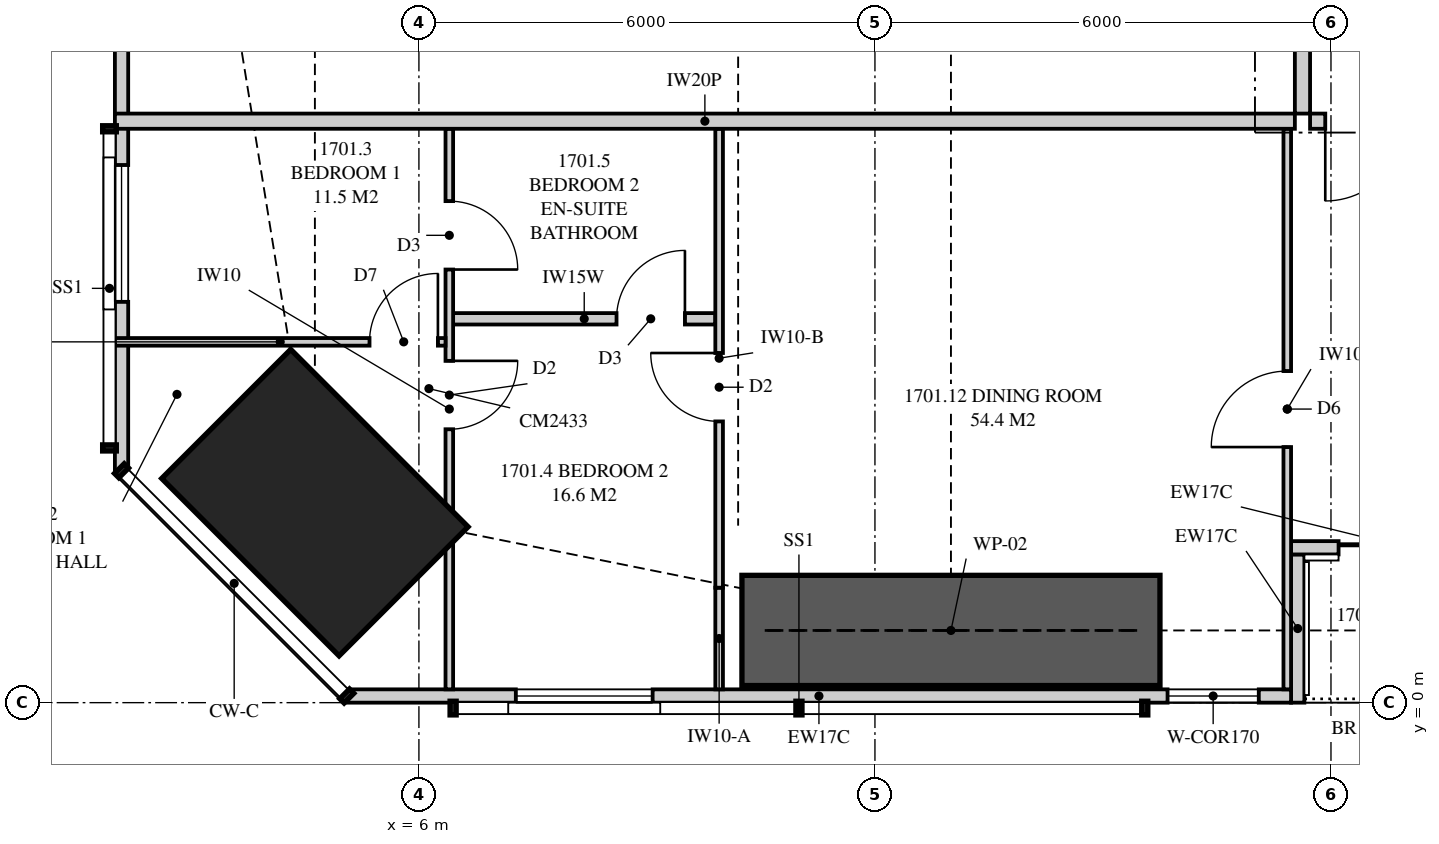
"""IFC4 building model, lengths in metres.
Left out: names, types, materials, properties, quantities, classifications, styles, units other than length and angle.
Written with IfcOpenShell. Run it as: python <this file> out.ifc"""

import sys

from ifc_helpers import new_model, si_unit, direction, frame, frame_2d, origin, origin_2d, place, context, subcontext, project, spatial, polyline, rectangle, outline, extrude, element, fill, save


model = new_model("IFC4")
c1 = context("Model", 3, precision=1e-05, world=origin(), true_north=direction((0.0, 1.0)))
c2 = subcontext(c1, "Body", "Model", "MODEL_VIEW")
j1 = project(units=[si_unit("LENGTHUNIT", "METRE"), si_unit("PLANEANGLEUNIT", "RADIAN")], contexts=[c1])
p1 = place(None, origin())
s1 = spatial("IfcSite", under=j1, at=p1, CompositionType="ELEMENT")
p2 = place(p1, origin())
s2 = spatial("IfcBuilding", under=s1, at=p2, CompositionType="ELEMENT")
p3 = place(p2, frame((0.0, 0.0, 64.55)))
s3 = spatial("IfcBuildingStorey", under=s2, at=p3, CompositionType="ELEMENT", Elevation=64.55)
p4 = place(p3, frame((4.631, 2.631, 0.0), z_axis=(0.0, 0.0, 1.0), x_axis=(0.707106781187, 0.707106781187, 0.0)))
e1 = element("IfcColumn", 1, at=p4, inside=s3, PredefinedType="COLUMN", context=c2, shape_type="SweptSolid", body=[
    extrude(rectangle(XDim=2.4, YDim=3.3, at=origin_2d()), origin(), (0.0, 0.0, 1.0), 3.35),
])
p5 = place(p3, frame((5.051, 0.087, 0.0), z_axis=(0.0, 0.0, 1.0), x_axis=(1.0, 0.0, 0.0)))
e2 = element("IfcWall", 2, at=p5, inside=s3, PredefinedType="SOLIDWALL", context=c2, shape_type="SweptSolid", body=[
    extrude(outline(polyline([(0.0, 0.0), (12.424, 0.0), (12.424, 2.15), (7.949, 2.15), (7.949, 3.11), (7.793, 3.11), (7.793, 2.15), (7.745, 2.15), (7.745, 3.11), (0.0, 3.11), (0.0, 0.0)])), frame((0.0, 0.087, 0.0), z_axis=(0.0, -1.0, 0.0), x_axis=(1.0, 0.0, 0.0)), (0.0, 0.0, 1.0), 0.175),
])
p6 = place(p5, frame((2.224, 0.0, 0.4)))
e3 = element("IfcOpeningElement", 3, at=p6, cuts=e2, PredefinedType="OPENING", context=c2, shape_type="SweptSolid", body=[
    extrude(rectangle(XDim=1.8, YDim=1.7, at=frame_2d((0.9, 0.85))), frame((0.0, 0.097, 0.0), z_axis=(0.0, -1.0, 0.0), x_axis=(1.0, 0.0, 0.0)), (0.0, 0.0, 1.0), 0.195),
])
p7 = place(p5, frame((10.799, 0.0, 0.4)))
e4 = element("IfcOpeningElement", 4, at=p7, cuts=e2, PredefinedType="OPENING", context=c2, shape_type="SweptSolid", body=[
    extrude(rectangle(XDim=1.2, YDim=1.7, at=frame_2d((0.6, 0.85))), frame((0.0, 0.097, 0.0), z_axis=(0.0, -1.0, 0.0), x_axis=(1.0, 0.0, 0.0)), (0.0, 0.0, 1.0), 0.195),
])
p8 = place(p3, frame((17.475, 2.038, 0.0), z_axis=(0.0, 0.0, 1.0), x_axis=(1.0, 0.0, 0.0)))
e5 = element("IfcWall", 5, at=p8, inside=s3, PredefinedType="SOLIDWALL", context=c2, shape_type="SweptSolid", body=[
    extrude(rectangle(XDim=3.05, YDim=0.175, at=frame_2d((1.525, 0.0))), origin(), (0.0, 0.0, 1.0), 3.11),
])
p9 = place(p8, frame((0.625, 0.0, 0.0)))
e6 = element("IfcOpeningElement", 6, at=p9, cuts=e5, PredefinedType="OPENING", context=c2, shape_type="SweptSolid", body=[
    extrude(rectangle(XDim=1.8, YDim=2.1, at=frame_2d((0.9, 1.05))), frame((0.0, 0.097, 0.0), z_axis=(0.0, -1.0, 0.0), x_axis=(1.0, 0.0, 0.0)), (0.0, 0.0, 1.0), 0.195),
])
p10 = place(p3, frame((17.562, 0.0, 0.0), z_axis=(0.0, 0.0, 1.0), x_axis=(0.0, 1.0, 0.0)))
e7 = element("IfcWall", 7, at=p10, inside=s3, PredefinedType="SOLIDWALL", context=c2, shape_type="SweptSolid", body=[
    extrude(outline(polyline([(0.0, 0.0), (1.95, 0.0), (1.95, 3.11), (1.75, 3.11), (1.75, 2.15), (0.15, 2.15), (0.15, 3.11), (0.0, 3.11), (0.0, 0.0)])), frame((0.0, 0.087, 0.0), z_axis=(0.0, -1.0, 0.0), x_axis=(1.0, 0.0, 0.0)), (0.0, 0.0, 1.0), 0.175),
])
p11 = place(p3, frame((2.087, 19.15, 0.0), z_axis=(0.0, 0.0, 1.0), x_axis=(0.0, -1.0, 0.0)))
e8 = element("IfcWall", 8, at=p11, inside=s3, PredefinedType="SOLIDWALL", context=c2, shape_type="SweptSolid", body=[
    extrude(outline(polyline([(0.0, 0.0), (16.099, 0.0), (16.099, 3.11), (6.369, 3.11), (6.369, 2.15), (6.276, 2.15), (6.276, 3.11), (6.15, 3.11), (6.15, 2.15), (0.0, 2.15), (0.0, 0.0)])), frame((0.0, 0.087, 0.0), z_axis=(0.0, -1.0, 0.0), x_axis=(1.0, 0.0, 0.0)), (0.0, 0.0, 1.0), 0.175),
])
p12 = place(p11, frame((1.488, 0.0, 0.4)))
e9 = element("IfcOpeningElement", 9, at=p12, cuts=e8, PredefinedType="OPENING", context=c2, shape_type="SweptSolid", body=[
    extrude(rectangle(XDim=1.8, YDim=1.7, at=frame_2d((0.9, 0.85))), frame((0.0, 0.097, 0.0), z_axis=(0.0, -1.0, 0.0), x_axis=(1.0, 0.0, 0.0)), (0.0, 0.0, 1.0), 0.195),
])
p13 = place(p11, frame((9.106, 0.0, 0.4)))
e10 = element("IfcOpeningElement", 10, at=p13, cuts=e8, PredefinedType="OPENING", context=c2, shape_type="SweptSolid", body=[
    extrude(rectangle(XDim=1.2, YDim=1.7, at=frame_2d((0.6, 0.85))), frame((0.0, 0.097, 0.0), z_axis=(0.0, -1.0, 0.0), x_axis=(1.0, 0.0, 0.0)), (0.0, 0.0, 1.0), 0.195),
])
p14 = place(p11, frame((12.077, 0.0, 0.4)))
e11 = element("IfcOpeningElement", 11, at=p14, cuts=e8, PredefinedType="OPENING", context=c2, shape_type="SweptSolid", body=[
    extrude(rectangle(XDim=1.8, YDim=1.7, at=frame_2d((0.9, 0.85))), frame((0.0, 0.097, 0.0), z_axis=(0.0, -1.0, 0.0), x_axis=(1.0, 0.0, 0.0)), (0.0, 0.0, 1.0), 0.195),
])
p15 = place(p3, frame((17.725, 7.65, 0.0), z_axis=(0.0, 0.0, 1.0), x_axis=(1.0, 0.0, 0.0)))
e12 = element("IfcWall", 12, at=p15, inside=s3, PredefinedType="PARTITIONING", context=c2, shape_type="SweptSolid", body=[
    extrude(outline(polyline([(0.0, 0.0), (16.075, 0.0), (16.075, 3.11), (6.612, 3.11), (6.612, 2.541), (5.938, 2.541), (5.938, 3.11), (0.0, 3.11), (0.0, 0.0)])), frame((0.0, 0.1, 0.0), z_axis=(0.0, -1.0, 0.0), x_axis=(1.0, 0.0, 0.0)), (0.0, 0.0, 1.0), 0.2),
])
p16 = place(p15, frame((0.2, 0.0, 0.0)))
e13 = element("IfcOpeningElement", 13, at=p16, cuts=e12, PredefinedType="OPENING", context=c2, shape_type="SweptSolid", body=[
    extrude(rectangle(XDim=1.05, YDim=2.2, at=frame_2d((0.525, 1.1))), frame((0.0, 0.11, 0.0), z_axis=(0.0, -1.0, 0.0), x_axis=(1.0, 0.0, 0.0)), (0.0, 0.0, 1.0), 0.22),
])
p17 = place(p3, frame((6.4, 0.175, 0.0), z_axis=(0.0, 0.0, 1.0), x_axis=(0.0, 1.0, 0.0)))
e14 = element("IfcWall", 14, at=p17, inside=s3, PredefinedType="PARTITIONING", context=c2, shape_type="SweptSolid", body=[
    extrude(outline(polyline([(0.0, 0.0), (7.375, 0.0), (7.375, 3.11), (2.978, 3.11), (2.978, 2.15), (1.224, 2.15), (1.224, 3.11), (0.0, 3.11), (0.0, 0.0)])), frame((0.0, 0.05, 0.0), z_axis=(0.0, -1.0, 0.0), x_axis=(1.0, 0.0, 0.0)), (0.0, 0.0, 1.0), 0.1),
])
p18 = place(p17, frame((3.422, 0.0, 0.0)))
e15 = element("IfcOpeningElement", 15, at=p18, cuts=e14, PredefinedType="OPENING", context=c2, shape_type="SweptSolid", body=[
    extrude(rectangle(XDim=0.9, YDim=2.1, at=frame_2d((0.45, 1.05))), frame((0.0, 0.06, 0.0), z_axis=(0.0, -1.0, 0.0), x_axis=(1.0, 0.0, 0.0)), (0.0, 0.0, 1.0), 0.12),
])
p19 = place(p17, frame((5.523, 0.0, 0.0)))
e16 = element("IfcOpeningElement", 16, at=p19, cuts=e14, PredefinedType="OPENING", context=c2, shape_type="SweptSolid", body=[
    extrude(rectangle(XDim=0.9, YDim=2.1, at=frame_2d((0.45, 1.05))), frame((0.0, 0.06, 0.0), z_axis=(0.0, -1.0, 0.0), x_axis=(1.0, 0.0, 0.0)), (0.0, 0.0, 1.0), 0.12),
])
p20 = place(p3, frame((9.95, 0.175, 0.0), z_axis=(0.0, 0.0, 1.0), x_axis=(0.0, 1.0, 0.0)))
e17 = element("IfcWall", 17, at=p20, inside=s3, PredefinedType="PARTITIONING", context=c2, shape_type="SweptSolid", body=[
    extrude(outline(polyline([(0.0, 0.0), (1.338, 0.0), (1.338, 2.15), (0.51, 2.15), (0.51, 3.11), (0.0, 3.11), (0.0, 0.0)])), frame((0.0, 0.05, 0.0), z_axis=(0.0, -1.0, 0.0), x_axis=(1.0, 0.0, 0.0)), (0.0, 0.0, 1.0), 0.1),
])
p21 = place(p3, frame((9.95, 1.513, 0.0), z_axis=(0.0, 0.0, 1.0), x_axis=(0.0, 1.0, 0.0)))
e18 = element("IfcWall", 18, at=p21, inside=s3, PredefinedType="PARTITIONING", context=c2, shape_type="SweptSolid", body=[
    extrude(outline(polyline([(0.0, 0.0), (6.037, 0.0), (6.037, 2.51), (0.927, 2.51), (0.927, 2.15), (0.0, 2.15), (0.0, 0.0)])), frame((0.0, 0.05, 0.0), z_axis=(0.0, -1.0, 0.0), x_axis=(1.0, 0.0, 0.0)), (0.0, 0.0, 1.0), 0.1),
])
p22 = place(p21, frame((2.188, 0.0, 0.0)))
e19 = element("IfcOpeningElement", 19, at=p22, cuts=e18, PredefinedType="OPENING", context=c2, shape_type="SweptSolid", body=[
    extrude(rectangle(XDim=0.9, YDim=2.1, at=frame_2d((0.45, 1.05))), frame((0.0, 0.06, 0.0), z_axis=(0.0, -1.0, 0.0), x_axis=(1.0, 0.0, 0.0)), (0.0, 0.0, 1.0), 0.12),
])
p23 = place(p3, frame((2.0, 4.747, 0.0), z_axis=(0.0, 0.0, 1.0), x_axis=(1.0, 0.0, 0.0)))
e20 = element("IfcWall", 20, at=p23, inside=s3, PredefinedType="PARTITIONING", context=c2, shape_type="SweptSolid", body=[
    extrude(outline(polyline([(0.0, 0.0), (4.35, 0.0), (4.35, 3.11), (3.16, 3.11), (3.16, 2.15), (1.417, 2.15), (1.417, 3.11), (0.0, 3.11), (0.0, 0.0)])), frame((0.0, 0.05, 0.0), z_axis=(0.0, -1.0, 0.0), x_axis=(1.0, 0.0, 0.0)), (0.0, 0.0, 1.0), 0.1),
])
p24 = place(p23, frame((3.35, 0.0, 0.0)))
e21 = element("IfcOpeningElement", 21, at=p24, cuts=e20, PredefinedType="OPENING", context=c2, shape_type="SweptSolid", body=[
    extrude(rectangle(XDim=0.9, YDim=2.1, at=frame_2d((0.45, 1.05))), frame((0.0, 0.06, 0.0), z_axis=(0.0, -1.0, 0.0), x_axis=(1.0, 0.0, 0.0)), (0.0, 0.0, 1.0), 0.12),
])
p25 = place(p3, frame((6.45, 5.05, 0.0), z_axis=(0.0, 0.0, 1.0), x_axis=(1.0, 0.0, 0.0)))
e22 = element("IfcWall", 22, at=p25, inside=s3, PredefinedType="PLUMBINGWALL", context=c2, shape_type="SweptSolid", body=[
    extrude(outline(polyline([(0.0, 0.0), (3.45, 0.0), (3.45, 3.11), (3.45, 2.51), (2.465, 2.51), (2.465, 3.11), (0.0, 3.11), (0.0, 0.0)])), frame((0.0, 0.075, 0.0), z_axis=(0.0, -1.0, 0.0), x_axis=(1.0, 0.0, 0.0)), (0.0, 0.0, 1.0), 0.15),
])
p26 = place(p25, frame((2.15, 0.0, 0.0)))
e23 = element("IfcOpeningElement", 23, at=p26, cuts=e22, PredefinedType="OPENING", context=c2, shape_type="SweptSolid", body=[
    extrude(rectangle(XDim=0.9, YDim=2.1, at=frame_2d((0.45, 1.05))), frame((0.0, 0.085, 0.0), z_axis=(0.0, -1.0, 0.0), x_axis=(1.0, 0.0, 0.0)), (0.0, 0.0, 1.0), 0.17),
])
p27 = place(p3, frame((17.425, 0.175, 0.0), z_axis=(0.0, 0.0, 1.0), x_axis=(0.0, 1.0, 0.0)))
e24 = element("IfcWall", 24, at=p27, inside=s3, PredefinedType="PARTITIONING", context=c2, shape_type="SweptSolid", body=[
    extrude(outline(polyline([(0.0, 0.0), (7.375, 0.0), (7.375, 3.11), (1.635, 3.11), (1.635, 2.15), (0.0, 2.15), (0.0, 3.11), (0.0, 0.0)])), frame((0.0, 0.05, 0.0), z_axis=(0.0, -1.0, 0.0), x_axis=(1.0, 0.0, 0.0)), (0.0, 0.0, 1.0), 0.1),
])
p28 = place(p27, frame((3.188, 0.0, 0.0)))
e25 = element("IfcOpeningElement", 25, at=p28, cuts=e24, PredefinedType="OPENING", context=c2, shape_type="SweptSolid", body=[
    extrude(rectangle(XDim=1.0, YDim=2.1, at=frame_2d((0.5, 1.05))), frame((0.0, 0.06, 0.0), z_axis=(0.0, -1.0, 0.0), x_axis=(1.0, 0.0, 0.0)), (0.0, 0.0, 1.0), 0.12),
])
p29 = place(p3, frame((2.0, 7.65, 0.0), z_axis=(0.0, 0.0, 1.0), x_axis=(1.0, 0.0, 0.0)))
e26 = element("IfcWall", 26, at=p29, inside=s3, PredefinedType="PARTITIONING", context=c2, shape_type="SweptSolid", body=[
    extrude(outline(polyline([(0.0, 0.0), (15.525, 0.0), (15.525, 3.11), (11.337, 3.11), (11.337, 2.541), (10.663, 2.541), (10.663, 3.11), (9.51, 3.11), (9.51, 2.51), (6.89, 2.51), (6.89, 3.11), (2.969, 3.11), (2.969, 2.541), (2.74, 2.541), (2.74, 2.15), (0.896, 2.15), (0.896, 3.11), (0.0, 3.11), (0.0, 0.0)])), frame((0.0, 0.1, 0.0), z_axis=(0.0, -1.0, 0.0), x_axis=(1.0, 0.0, 0.0)), (0.0, 0.0, 1.0), 0.2),
])
p30 = place(p3, frame((17.625, 7.75, 0.0), z_axis=(0.0, 0.0, 1.0), x_axis=(0.0, 1.0, 0.0)))
e27 = element("IfcWall", 27, at=p30, inside=s3, PredefinedType="PARTITIONING", context=c2, shape_type="SweptSolid", body=[
    extrude(outline(polyline([(0.0, 0.0), (6.15, 0.0), (6.15, 3.11), (5.587, 3.11), (5.587, 2.541), (4.913, 2.541), (4.913, 3.11), (0.0, 3.11), (0.0, 0.0)])), frame((0.0, 0.1, 0.0), z_axis=(0.0, -1.0, 0.0), x_axis=(1.0, 0.0, 0.0)), (0.0, 0.0, 1.0), 0.2),
])
p31 = place(p30, frame((2.175, 0.0, 0.0)))
e28 = element("IfcOpeningElement", 28, at=p31, cuts=e27, PredefinedType="OPENING", context=c2, shape_type="SweptSolid", body=[
    extrude(rectangle(XDim=1.8, YDim=2.1, at=frame_2d((0.9, 1.05))), frame((0.0, 0.11, 0.0), z_axis=(0.0, -1.0, 0.0), x_axis=(1.0, 0.0, 0.0)), (0.0, 0.0, 1.0), 0.22),
])
p32 = place(p3, frame((10.25, 0.95, 0.0), z_axis=(0.0, 0.0, 1.0), x_axis=(1.0, 0.0, 0.0)))
e29 = element("IfcWall", 29, at=p32, inside=s3, PredefinedType="SHEAR", context=c2, shape_type="SweptSolid", body=[
    extrude(rectangle(XDim=5.5, YDim=1.45, at=frame_2d((2.75, 0.0))), origin(), (0.0, 0.0, 1.0), 3.35),
])
p33 = place(p6, origin())
e30 = element("IfcWindow", 30, at=p33, inside=s3, PartitioningType="SINGLE_PANEL", PredefinedType="WINDOW", context=c2, shape_type="SweptSolid", body=[
    extrude(rectangle(XDim=1.8, YDim=1.7, at=frame_2d((0.9, 0.85))), frame((0.0, 0.03, 0.0), z_axis=(0.0, -1.0, 0.0), x_axis=(1.0, 0.0, 0.0)), (0.0, 0.0, 1.0), 0.06),
])
fill(e3, e30)
p34 = place(p7, origin())
e31 = element("IfcWindow", 31, at=p34, inside=s3, PartitioningType="SINGLE_PANEL", PredefinedType="WINDOW", context=c2, shape_type="SweptSolid", body=[
    extrude(rectangle(XDim=1.2, YDim=1.7, at=frame_2d((0.6, 0.85))), frame((0.0, 0.03, 0.0), z_axis=(0.0, -1.0, 0.0), x_axis=(1.0, 0.0, 0.0)), (0.0, 0.0, 1.0), 0.06),
])
fill(e4, e31)
p35 = place(p9, origin())
e32 = element("IfcDoor", 32, at=p35, inside=s3, OperationType="SLIDING_TO_LEFT", PredefinedType="DOOR", context=c2, shape_type="SweptSolid", body=[
    extrude(rectangle(XDim=1.8, YDim=2.1, at=frame_2d((0.9, 1.05))), frame((0.0, 0.025, 0.0), z_axis=(0.0, -1.0, 0.0), x_axis=(1.0, 0.0, 0.0)), (0.0, 0.0, 1.0), 0.05),
])
fill(e6, e32)
p36 = place(p14, origin())
e33 = element("IfcWindow", 33, at=p36, inside=s3, PartitioningType="SINGLE_PANEL", PredefinedType="WINDOW", context=c2, shape_type="SweptSolid", body=[
    extrude(rectangle(XDim=1.8, YDim=1.7, at=frame_2d((0.9, 0.85))), frame((0.0, 0.03, 0.0), z_axis=(0.0, -1.0, 0.0), x_axis=(1.0, 0.0, 0.0)), (0.0, 0.0, 1.0), 0.06),
])
fill(e11, e33)
p37 = place(p16, frame((1.05, 0.0, 0.0), z_axis=(0.0, 0.0, 1.0), x_axis=(-1.0, 0.0, 0.0)))
e34 = element("IfcDoor", 34, at=p37, inside=s3, OperationType="SINGLE_SWING_RIGHT", PredefinedType="DOOR", context=c2, shape_type="SweptSolid", body=[
    extrude(rectangle(XDim=1.05, YDim=2.2, at=frame_2d((0.525, 1.1))), frame((0.0, 0.025, 0.0), z_axis=(0.0, -1.0, 0.0), x_axis=(1.0, 0.0, 0.0)), (0.0, 0.0, 1.0), 0.05),
])
fill(e13, e34)
p38 = place(p24, origin())
e35 = element("IfcDoor", 35, at=p38, inside=s3, OperationType="SINGLE_SWING_RIGHT", PredefinedType="DOOR", context=c2, shape_type="SweptSolid", body=[
    extrude(rectangle(XDim=0.9, YDim=2.1, at=frame_2d((0.45, 1.05))), frame((0.0, 0.025, 0.0), z_axis=(0.0, -1.0, 0.0), x_axis=(1.0, 0.0, 0.0)), (0.0, 0.0, 1.0), 0.05),
])
fill(e21, e35)
p39 = place(p18, frame((0.9, 0.0, 0.0), z_axis=(0.0, 0.0, 1.0), x_axis=(-1.0, 0.0, 0.0)))
e36 = element("IfcDoor", 36, at=p39, inside=s3, OperationType="SINGLE_SWING_LEFT", PredefinedType="DOOR", context=c2, shape_type="SweptSolid", body=[
    extrude(rectangle(XDim=0.9, YDim=2.1, at=frame_2d((0.45, 1.05))), frame((0.0, 0.025, 0.0), z_axis=(0.0, -1.0, 0.0), x_axis=(1.0, 0.0, 0.0)), (0.0, 0.0, 1.0), 0.05),
])
fill(e15, e36)
p40 = place(p22, origin())
e37 = element("IfcDoor", 37, at=p40, inside=s3, OperationType="SINGLE_SWING_RIGHT", PredefinedType="DOOR", context=c2, shape_type="SweptSolid", body=[
    extrude(rectangle(XDim=0.9, YDim=2.1, at=frame_2d((0.45, 1.05))), frame((0.0, 0.025, 0.0), z_axis=(0.0, -1.0, 0.0), x_axis=(1.0, 0.0, 0.0)), (0.0, 0.0, 1.0), 0.05),
])
fill(e19, e37)
p41 = place(p26, origin())
e38 = element("IfcDoor", 38, at=p41, inside=s3, OperationType="SINGLE_SWING_RIGHT", PredefinedType="DOOR", context=c2, shape_type="SweptSolid", body=[
    extrude(rectangle(XDim=0.9, YDim=2.1, at=frame_2d((0.45, 1.05))), frame((0.0, 0.025, 0.0), z_axis=(0.0, -1.0, 0.0), x_axis=(1.0, 0.0, 0.0)), (0.0, 0.0, 1.0), 0.05),
])
fill(e23, e38)
p42 = place(p19, frame((0.9, 0.0, 0.0), z_axis=(0.0, 0.0, 1.0), x_axis=(-1.0, 0.0, 0.0)))
e39 = element("IfcDoor", 39, at=p42, inside=s3, OperationType="SINGLE_SWING_RIGHT", PredefinedType="DOOR", context=c2, shape_type="SweptSolid", body=[
    extrude(rectangle(XDim=0.9, YDim=2.1, at=frame_2d((0.45, 1.05))), frame((0.0, 0.025, 0.0), z_axis=(0.0, -1.0, 0.0), x_axis=(1.0, 0.0, 0.0)), (0.0, 0.0, 1.0), 0.05),
])
fill(e16, e39)
p43 = place(p28, origin())
e40 = element("IfcDoor", 40, at=p43, inside=s3, OperationType="SINGLE_SWING_LEFT", PredefinedType="DOOR", context=c2, shape_type="SweptSolid", body=[
    extrude(rectangle(XDim=1.0, YDim=2.1, at=frame_2d((0.5, 1.05))), frame((0.0, 0.025, 0.0), z_axis=(0.0, -1.0, 0.0), x_axis=(1.0, 0.0, 0.0)), (0.0, 0.0, 1.0), 0.05),
])
fill(e25, e40)
save(model, sys.argv[1])
